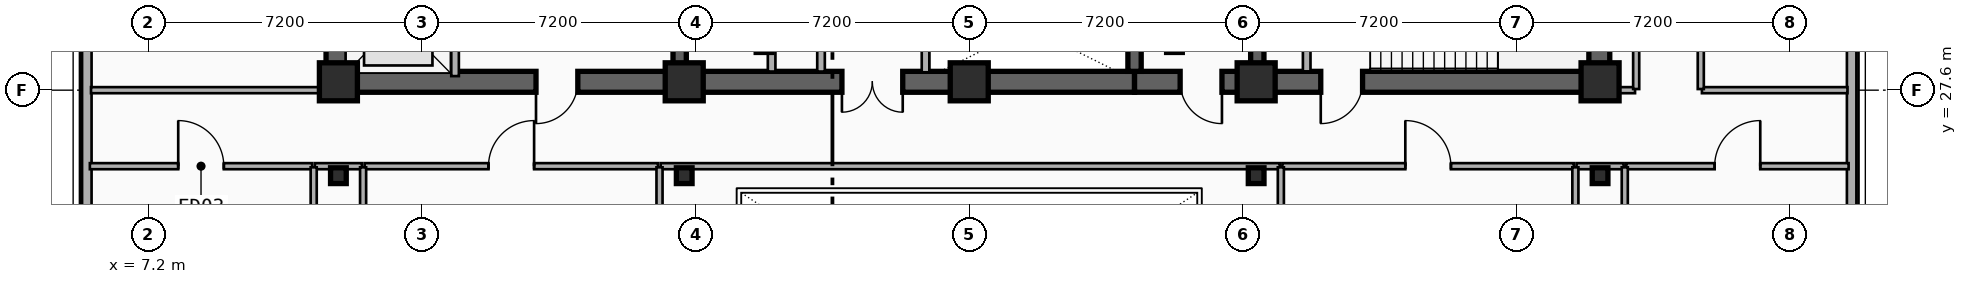
"""IFC4 building model, lengths in metres.
Left out: names, types, materials, properties, quantities, classifications, styles, units other than length and angle.
Written with IfcOpenShell. Run it as: python <this file> out.ifc"""

import sys

from ifc_helpers import new_model, si_unit, direction, frame, frame_2d, origin, origin_2d, place, context, subcontext, project, spatial, rectangle, i_section, extrude, element, fill, save


model = new_model("IFC4")
c1 = context("Model", 3, precision=1e-05, world=origin(), true_north=direction((0.0, 1.0)))
c2 = subcontext(c1, "Body", "Model", "MODEL_VIEW")
j1 = project(units=[si_unit("LENGTHUNIT", "METRE"), si_unit("PLANEANGLEUNIT", "RADIAN")], contexts=[c1])
p1 = place(None, origin())
s1 = spatial("IfcSite", under=j1, at=p1, CompositionType="ELEMENT")
p2 = place(p1, origin())
s2 = spatial("IfcBuilding", under=s1, at=p2, CompositionType="ELEMENT")
p3 = place(p2, frame((0.0, 0.0, 188.4)))
s3 = spatial("IfcBuildingStorey", under=s2, at=p3, CompositionType="ELEMENT", Elevation=188.4)
p4 = place(p3, frame((21.18, 27.82, 0.0), z_axis=(0.0, 0.0, 1.0), x_axis=(-1.0, 0.0, 0.0)))
e1 = element("IfcWall", 1, at=p4, inside=s3, PredefinedType="SHEAR", context=c2, shape_type="SweptSolid", body=[
    extrude(rectangle(XDim=9.03, YDim=0.55, at=frame_2d((4.515, 0.0))), origin(), (0.0, 0.0, 1.0), 4.8),
])
p5 = place(p4, frame((2.68, 0.0, 0.0)))
e2 = element("IfcOpeningElement", 2, at=p5, cuts=e1, PredefinedType="OPENING", context=c2, shape_type="SweptSolid", body=[
    extrude(rectangle(XDim=1.1, YDim=2.15, at=frame_2d((0.55, 1.075))), frame((0.0, 0.285, 0.0), z_axis=(0.0, -1.0, 0.0), x_axis=(1.0, 0.0, 0.0)), (0.0, 0.0, 1.0), 0.57),
])
p6 = place(p3, frame((33.15, 27.82, 0.0), z_axis=(0.0, 0.0, 1.0), x_axis=(-1.0, 0.0, 0.0)))
e3 = element("IfcWall", 3, at=p6, inside=s3, PredefinedType="SHEAR", context=c2, shape_type="SweptSolid", body=[
    extrude(rectangle(XDim=11.97, YDim=0.55, at=frame_2d((5.985, 0.0))), origin(), (0.0, 0.0, 1.0), 4.8),
])
p7 = place(p6, frame((6.1, 0.0, 0.0)))
e4 = element("IfcOpeningElement", 4, at=p7, cuts=e3, PredefinedType="OPENING", context=c2, shape_type="SweptSolid", body=[
    extrude(rectangle(XDim=1.6, YDim=2.2, at=frame_2d((0.8, 1.1))), frame((0.0, 0.285, 0.0), z_axis=(0.0, -1.0, 0.0), x_axis=(1.0, 0.0, 0.0)), (0.0, 0.0, 1.0), 0.57),
])
p8 = place(p3, frame((45.38, 27.82, 0.0), z_axis=(0.0, 0.0, 1.0), x_axis=(-1.0, 0.0, 0.0)))
e5 = element("IfcWall", 5, at=p8, inside=s3, PredefinedType="SHEAR", context=c2, shape_type="SweptSolid", body=[
    extrude(rectangle(XDim=12.23, YDim=0.55, at=frame_2d((6.115, 0.0))), origin(), (0.0, 0.0, 1.0), 4.8),
])
p9 = place(p8, frame((9.93, 0.0, 0.0)))
e6 = element("IfcOpeningElement", 6, at=p9, cuts=e5, PredefinedType="OPENING", context=c2, shape_type="SweptSolid", body=[
    extrude(rectangle(XDim=1.1, YDim=2.15, at=frame_2d((0.55, 1.075))), frame((0.0, 0.285, 0.0), z_axis=(0.0, -1.0, 0.0), x_axis=(1.0, 0.0, 0.0)), (0.0, 0.0, 1.0), 0.57),
])
p10 = place(p8, frame((6.23, 0.0, 0.0)))
e7 = element("IfcOpeningElement", 7, at=p10, cuts=e5, PredefinedType="OPENING", context=c2, shape_type="SweptSolid", body=[
    extrude(rectangle(XDim=1.1, YDim=2.15, at=frame_2d((0.55, 1.075))), frame((0.0, 0.285, 0.0), z_axis=(0.0, -1.0, 0.0), x_axis=(1.0, 0.0, 0.0)), (0.0, 0.0, 1.0), 0.57),
])
for number, where, z_axis, x_axis in (
    (8, (12.15, 28.095, 0.0), (0.0, 0.0, 1.0), (0.0, 1.0, 0.0)),
    (9, (45.38, 28.095, 0.0), (0.0, 0.0, 1.0), (0.0, 1.0, 0.0)),
):
    element("IfcWall", number, at=place(p3, frame(where, z_axis=z_axis, x_axis=x_axis)), inside=s3, PredefinedType="SHEAR", context=c2, shape_type="SweptSolid", body=[
        extrude(rectangle(XDim=8.68, YDim=0.55, at=frame_2d((4.34, 0.0))), origin(), (0.0, 0.0, 1.0), 4.8),
    ])
for number, where, z_axis, x_axis in (
    (10, (21.18, 28.095, 0.0), (0.0, 0.0, 1.0), (0.0, 1.0, 0.0)),
    (11, (33.15, 28.095, 0.0), (0.0, 0.0, 1.0), (0.0, 1.0, 0.0)),
):
    element("IfcWall", number, at=place(p3, frame(where, z_axis=z_axis, x_axis=x_axis)), inside=s3, PredefinedType="SHEAR", context=c2, shape_type="SweptSolid", body=[
        extrude(rectangle(XDim=8.68, YDim=0.35, at=frame_2d((4.34, 0.0))), origin(), (0.0, 0.0, 1.0), 4.8),
    ])
p11 = place(p3, frame((36.38, 28.095, 0.0), z_axis=(0.0, 0.0, 1.0), x_axis=(0.0, 1.0, 0.0)))
e12 = element("IfcWall", 12, at=p11, inside=s3, PredefinedType="SHEAR", context=c2, shape_type="SweptSolid", body=[
    extrude(rectangle(XDim=8.68, YDim=0.35, at=frame_2d((4.34, 0.0))), origin(), (0.0, 0.0, 1.0), 4.8),
])
p12 = place(p11, frame((3.685, 0.0, 0.0)))
e13 = element("IfcOpeningElement", 13, at=p12, cuts=e12, PredefinedType="OPENING", context=c2, shape_type="SweptSolid", body=[
    extrude(rectangle(XDim=1.1, YDim=2.15, at=frame_2d((0.55, 1.075))), frame((0.0, 0.185, 0.0), z_axis=(0.0, -1.0, 0.0), x_axis=(1.0, 0.0, 0.0)), (0.0, 0.0, 1.0), 0.37),
])
for number, where, z_axis, x_axis in (
    (14, (23.4, 28.8, 0.0), (0.0, 0.0, 1.0), (1.0, 0.0, 0.0)),
    (15, (34.2, 28.8, 0.0), (0.0, 0.0, 1.0), (1.0, 0.0, 0.0)),
):
    element("IfcColumn", number, at=place(p3, frame(where, z_axis=z_axis, x_axis=x_axis)), inside=s3, PredefinedType="COLUMN", context=c2, shape_type="SweptSolid", body=[
        extrude(i_section(OverallWidth=0.413, OverallDepth=0.415, WebThickness=0.03, FlangeThickness=0.047, FilletRadius=0.015, at=origin_2d()), origin(), (0.0, 0.0, 1.0), 4.8),
    ])
for number, where, z_axis, x_axis in (
    (16, (12.2, 27.82, 0.0), (0.0, 0.0, 1.0), (1.0, 0.0, 0.0)),
    (17, (21.3, 27.82, 0.0), (0.0, 0.0, 1.0), (1.0, 0.0, 0.0)),
    (18, (28.8, 27.82, 0.0), (0.0, 0.0, 1.0), (1.0, 0.0, 0.0)),
    (19, (36.35, 27.82, 0.0), (0.0, 0.0, 1.0), (1.0, 0.0, 0.0)),
    (20, (45.4, 27.82, 0.0), (0.0, 0.0, 1.0), (1.0, 0.0, 0.0)),
):
    element("IfcColumn", number, at=place(p3, frame(where, z_axis=z_axis, x_axis=x_axis)), inside=s3, PredefinedType="COLUMN", context=c2, shape_type="SweptSolid", body=[
        extrude(rectangle(XDim=1.0, YDim=1.0, at=origin_2d()), origin(), (0.0, 0.0, 1.0), 4.8),
    ])
for number, where, z_axis, x_axis in (
    (21, (12.2, 25.35, 0.0), (0.0, 0.0, 1.0), (1.0, 0.0, 0.0)),
    (22, (21.3, 25.35, 0.0), (0.0, 0.0, 1.0), (1.0, 0.0, 0.0)),
    (23, (36.35, 25.35, 0.0), (0.0, 0.0, 1.0), (1.0, 0.0, 0.0)),
    (24, (45.4, 25.35, 0.0), (0.0, 0.0, 1.0), (1.0, 0.0, 0.0)),
):
    element("IfcColumn", number, at=place(p3, frame(where, z_axis=z_axis, x_axis=x_axis)), inside=s3, PredefinedType="COLUMN", context=c2, shape_type="SweptSolid", body=[
        extrude(i_section(OverallWidth=0.413, OverallDepth=0.415, WebThickness=0.03, FlangeThickness=0.047, FilletRadius=0.015, at=origin_2d()), origin(), (0.0, 0.0, 1.0), 4.8),
    ])
for number, where, z_axis, x_axis in (
    (25, (52.02, 37.6, 0.0), (0.0, 0.0, 1.0), (0.0, -1.0, 0.0)),
    (26, (5.58, 14.6, 0.0), (0.0, 0.0, 1.0), (0.0, 1.0, 0.0)),
):
    element("IfcWall", number, at=place(p3, frame(where, z_axis=z_axis, x_axis=x_axis)), inside=s3, PredefinedType="SOLIDWALL", context=c2, shape_type="SweptSolid", body=[
        extrude(rectangle(XDim=23.0, YDim=0.25, at=frame_2d((11.5, 0.0))), origin(), (0.0, 0.0, 1.0), 4.48),
    ])
p13 = place(p3, frame((15.27, 27.97, 0.0), z_axis=(0.0, 0.0, 1.0), x_axis=(0.0, 1.0, 0.0)))
e27 = element("IfcWall", 27, at=p13, inside=s3, PredefinedType="PARTITIONING", context=c2, shape_type="SweptSolid", body=[
    extrude(rectangle(XDim=2.96, YDim=0.2, at=frame_2d((1.48, 0.0))), origin(), (0.0, 0.0, 1.0), 3.55),
])
p14 = place(p13, frame((0.93, 0.0, 0.0)))
e28 = element("IfcOpeningElement", 28, at=p14, cuts=e27, PredefinedType="OPENING", context=c2, shape_type="SweptSolid", body=[
    extrude(rectangle(XDim=1.1, YDim=2.15, at=frame_2d((0.55, 1.075))), frame((0.0, 0.11, 0.0), z_axis=(0.0, -1.0, 0.0), x_axis=(1.0, 0.0, 0.0)), (0.0, 0.0, 1.0), 0.22),
])
p15 = place(p3, frame((27.65, 28.07, 0.0), z_axis=(0.0, 0.0, 1.0), x_axis=(0.0, 1.0, 0.0)))
e29 = element("IfcWall", 29, at=p15, inside=s3, PredefinedType="PARTITIONING", context=c2, shape_type="SweptSolid", body=[
    extrude(rectangle(XDim=2.58, YDim=0.2, at=frame_2d((1.29, 0.0))), origin(), (0.0, 0.0, 1.0), 3.55),
])
p16 = place(p3, frame((37.68, 28.095, 0.0), z_axis=(0.0, 0.0, 1.0), x_axis=(0.0, 1.0, 0.0)))
e30 = element("IfcWall", 30, at=p16, inside=s3, PredefinedType="PARTITIONING", context=c2, shape_type="SweptSolid", body=[
    extrude(rectangle(XDim=3.155, YDim=0.2, at=frame_2d((1.578, 0.0))), origin(), (0.0, 0.0, 1.0), 3.86),
])
p17 = place(p3, frame((24.9, 28.09, 0.0), z_axis=(0.0, 0.0, 1.0), x_axis=(0.0, 1.0, 0.0)))
e31 = element("IfcWall", 31, at=p17, inside=s3, PredefinedType="PARTITIONING", context=c2, shape_type="SweptSolid", body=[
    extrude(rectangle(XDim=2.62, YDim=0.2, at=frame_2d((1.31, 0.0))), origin(), (0.0, 0.0, 1.0), 3.86),
])
p18 = place(p17, frame((1.185, 0.0, 0.0)))
e32 = element("IfcOpeningElement", 32, at=p18, cuts=e31, PredefinedType="OPENING", context=c2, shape_type="SweptSolid", body=[
    extrude(rectangle(XDim=1.2, YDim=2.15, at=frame_2d((0.6, 1.075))), frame((0.0, 0.11, 0.0), z_axis=(0.0, -1.0, 0.0), x_axis=(1.0, 0.0, 0.0)), (0.0, 0.0, 1.0), 0.22),
])
p19 = place(p3, frame((23.6, 28.09, 0.0), z_axis=(0.0, 0.0, 1.0), x_axis=(0.0, 1.0, 0.0)))
e33 = element("IfcWall", 33, at=p19, inside=s3, PredefinedType="PARTITIONING", context=c2, shape_type="SweptSolid", body=[
    extrude(rectangle(XDim=2.62, YDim=0.2, at=frame_2d((1.31, 0.0))), origin(), (0.0, 0.0, 1.0), 3.86),
])
p20 = place(p3, frame((5.66, 25.6, 0.0), z_axis=(0.0, 0.0, 1.0), x_axis=(1.0, 0.0, 0.0)))
e34 = element("IfcWall", 34, at=p20, inside=s3, PredefinedType="PARTITIONING", context=c2, shape_type="SweptSolid", body=[
    extrude(rectangle(XDim=5.85, YDim=0.16, at=frame_2d((2.925, 0.0))), origin(), (0.0, 0.0, 1.0), 3.81),
])
p21 = place(p20, frame((2.325, 0.0, 0.0)))
e35 = element("IfcOpeningElement", 35, at=p21, cuts=e34, PredefinedType="OPENING", context=c2, shape_type="SweptSolid", body=[
    extrude(rectangle(XDim=1.2, YDim=2.15, at=frame_2d((0.6, 1.075))), frame((0.0, 0.09, 0.0), z_axis=(0.0, -1.0, 0.0), x_axis=(1.0, 0.0, 0.0)), (0.0, 0.0, 1.0), 0.18),
])
p22 = place(p3, frame((12.89, 25.6, 0.0), z_axis=(0.0, 0.0, 1.0), x_axis=(1.0, 0.0, 0.0)))
e36 = element("IfcWall", 36, at=p22, inside=s3, PredefinedType="PARTITIONING", context=c2, shape_type="SweptSolid", body=[
    extrude(rectangle(XDim=7.72, YDim=0.16, at=frame_2d((3.86, 0.0))), origin(), (0.0, 0.0, 1.0), 4.48),
])
p23 = place(p22, frame((3.26, 0.0, 0.0)))
e37 = element("IfcOpeningElement", 37, at=p23, cuts=e36, PredefinedType="OPENING", context=c2, shape_type="SweptSolid", body=[
    extrude(rectangle(XDim=1.2, YDim=2.15, at=frame_2d((0.6, 1.075))), frame((0.0, 0.09, 0.0), z_axis=(0.0, -1.0, 0.0), x_axis=(1.0, 0.0, 0.0)), (0.0, 0.0, 1.0), 0.18),
])
p24 = place(p3, frame((37.04, 25.6, 0.0), z_axis=(0.0, 0.0, 1.0), x_axis=(1.0, 0.0, 0.0)))
e38 = element("IfcWall", 38, at=p24, inside=s3, PredefinedType="PARTITIONING", context=c2, shape_type="SweptSolid", body=[
    extrude(rectangle(XDim=7.67, YDim=0.16, at=frame_2d((3.835, 0.0))), origin(), (0.0, 0.0, 1.0), 4.48),
])
p25 = place(p24, frame((3.235, 0.0, 0.0)))
e39 = element("IfcOpeningElement", 39, at=p25, cuts=e38, PredefinedType="OPENING", context=c2, shape_type="SweptSolid", body=[
    extrude(rectangle(XDim=1.2, YDim=2.15, at=frame_2d((0.6, 1.075))), frame((0.0, 0.09, 0.0), z_axis=(0.0, -1.0, 0.0), x_axis=(1.0, 0.0, 0.0)), (0.0, 0.0, 1.0), 0.18),
])
p26 = place(p3, frame((46.09, 25.6, 0.0), z_axis=(0.0, 0.0, 1.0), x_axis=(1.0, 0.0, 0.0)))
e40 = element("IfcWall", 40, at=p26, inside=s3, PredefinedType="PARTITIONING", context=c2, shape_type="SweptSolid", body=[
    extrude(rectangle(XDim=5.85, YDim=0.16, at=frame_2d((2.925, 0.0))), origin(), (0.0, 0.0, 1.0), 3.81),
])
p27 = place(p26, frame((2.325, 0.0, 0.0)))
e41 = element("IfcOpeningElement", 41, at=p27, cuts=e40, PredefinedType="OPENING", context=c2, shape_type="SweptSolid", body=[
    extrude(rectangle(XDim=1.2, YDim=2.15, at=frame_2d((0.6, 1.075))), frame((0.0, 0.09, 0.0), z_axis=(0.0, -1.0, 0.0), x_axis=(1.0, 0.0, 0.0)), (0.0, 0.0, 1.0), 0.18),
])
p28 = place(p3, frame((11.58, 25.6, 0.0), z_axis=(0.0, 0.0, 1.0), x_axis=(1.0, 0.0, 0.0)))
e42 = element("IfcWall", 42, at=p28, inside=s3, PredefinedType="PARTITIONING", context=c2, shape_type="SweptSolid", body=[
    extrude(rectangle(XDim=1.24, YDim=0.16, at=frame_2d((0.62, 0.0))), origin(), (0.0, 0.0, 1.0), 3.56),
])
p29 = place(p3, frame((20.68, 25.6, 0.0), z_axis=(0.0, 0.0, 1.0), x_axis=(1.0, 0.0, 0.0)))
e43 = element("IfcWall", 43, at=p29, inside=s3, PredefinedType="PARTITIONING", context=c2, shape_type="SweptSolid", body=[
    extrude(rectangle(XDim=16.29, YDim=0.16, at=frame_2d((8.145, 0.0))), origin(), (0.0, 0.0, 1.0), 3.56),
])
p30 = place(p3, frame((44.78, 25.6, 0.0), z_axis=(0.0, 0.0, 1.0), x_axis=(1.0, 0.0, 0.0)))
e44 = element("IfcWall", 44, at=p30, inside=s3, PredefinedType="PARTITIONING", context=c2, shape_type="SweptSolid", body=[
    extrude(rectangle(XDim=1.24, YDim=0.16, at=frame_2d((0.62, 0.0))), origin(), (0.0, 0.0, 1.0), 3.56),
])
p31 = place(p3, frame((5.69, 27.6, 0.0), z_axis=(0.0, 0.0, 1.0), x_axis=(1.0, 0.0, 0.0)))
e45 = element("IfcWall", 45, at=p31, inside=s3, PredefinedType="PARTITIONING", context=c2, shape_type="SweptSolid", body=[
    extrude(rectangle(XDim=6.43, YDim=0.16, at=frame_2d((3.215, 0.0))), origin(), (0.0, 0.0, 1.0), 3.55),
])
p32 = place(p3, frame((45.41, 27.6, 0.0), z_axis=(0.0, 0.0, 1.0), x_axis=(1.0, 0.0, 0.0)))
e46 = element("IfcWall", 46, at=p32, inside=s3, PredefinedType="PARTITIONING", context=c2, shape_type="SweptSolid", body=[
    extrude(rectangle(XDim=0.91, YDim=0.16, at=frame_2d((0.455, 0.0))), origin(), (0.0, 0.0, 1.0), 3.55),
])
p33 = place(p3, frame((48.08, 27.6, 0.0), z_axis=(0.0, 0.0, 1.0), x_axis=(1.0, 0.0, 0.0)))
e47 = element("IfcWall", 47, at=p33, inside=s3, PredefinedType="PARTITIONING", context=c2, shape_type="SweptSolid", body=[
    extrude(rectangle(XDim=3.83, YDim=0.16, at=frame_2d((1.915, 0.0))), origin(), (0.0, 0.0, 1.0), 3.81),
])
for number, where, z_axis, x_axis in (
    (48, (46.35, 27.63, 0.0), (0.0, 0.0, 1.0), (0.0, 1.0, 0.0)),
    (49, (48.05, 27.63, 0.0), (0.0, 0.0, 1.0), (0.0, 1.0, 0.0)),
):
    element("IfcWall", number, at=place(p3, frame(where, z_axis=z_axis, x_axis=x_axis)), inside=s3, PredefinedType="PARTITIONING", context=c2, shape_type="SweptSolid", body=[
        extrude(rectangle(XDim=10.24, YDim=0.16, at=frame_2d((5.12, 0.0))), origin(), (0.0, 0.0, 1.0), 3.96),
    ])
for number, where, z_axis, x_axis in (
    (50, (11.55, 10.69, 0.0), (0.0, 0.0, 1.0), (0.0, 1.0, 0.0)),
    (51, (12.85, 10.69, 0.0), (0.0, 0.0, 1.0), (0.0, 1.0, 0.0)),
    (52, (20.65, 10.69, 0.0), (0.0, 0.0, 1.0), (0.0, 1.0, 0.0)),
    (53, (37.0, 10.69, 0.0), (0.0, 0.0, 1.0), (0.0, 1.0, 0.0)),
    (54, (44.75, 10.69, 0.0), (0.0, 0.0, 1.0), (0.0, 1.0, 0.0)),
    (55, (46.05, 10.69, 0.0), (0.0, 0.0, 1.0), (0.0, 1.0, 0.0)),
):
    element("IfcWall", number, at=place(p3, frame(where, z_axis=z_axis, x_axis=x_axis)), inside=s3, PredefinedType="PARTITIONING", context=c2, shape_type="SweptSolid", body=[
        extrude(rectangle(XDim=14.88, YDim=0.16, at=frame_2d((7.44, 0.0))), origin(), (0.0, 0.0, 1.0), 3.96),
    ])
p34 = place(p5, origin())
e56 = element("IfcDoor", 56, at=p34, inside=s3, OperationType="SINGLE_SWING_RIGHT", PredefinedType="DOOR", context=c2, shape_type="SweptSolid", body=[
    extrude(rectangle(XDim=1.1, YDim=2.15, at=frame_2d((0.55, 1.075))), frame((0.0, 0.025, 0.0), z_axis=(0.0, -1.0, 0.0), x_axis=(1.0, 0.0, 0.0)), (0.0, 0.0, 1.0), 0.05),
])
fill(e2, e56)
p35 = place(p9, origin())
e57 = element("IfcDoor", 57, at=p35, inside=s3, OperationType="SINGLE_SWING_LEFT", PredefinedType="DOOR", context=c2, shape_type="SweptSolid", body=[
    extrude(rectangle(XDim=1.1, YDim=2.15, at=frame_2d((0.55, 1.075))), frame((0.0, 0.025, 0.0), z_axis=(0.0, -1.0, 0.0), x_axis=(1.0, 0.0, 0.0)), (0.0, 0.0, 1.0), 0.05),
])
fill(e6, e57)
p36 = place(p10, origin())
e58 = element("IfcDoor", 58, at=p36, inside=s3, OperationType="SINGLE_SWING_RIGHT", PredefinedType="DOOR", context=c2, shape_type="SweptSolid", body=[
    extrude(rectangle(XDim=1.1, YDim=2.15, at=frame_2d((0.55, 1.075))), frame((0.0, 0.025, 0.0), z_axis=(0.0, -1.0, 0.0), x_axis=(1.0, 0.0, 0.0)), (0.0, 0.0, 1.0), 0.05),
])
fill(e7, e58)
p37 = place(p7, origin())
e59 = element("IfcDoor", 59, at=p37, inside=s3, OperationType="SINGLE_SWING_LEFT", PredefinedType="DOOR", context=c2, shape_type="SweptSolid", body=[
    extrude(rectangle(XDim=1.6, YDim=2.2, at=frame_2d((0.8, 1.1))), frame((0.0, 0.025, 0.0), z_axis=(0.0, -1.0, 0.0), x_axis=(1.0, 0.0, 0.0)), (0.0, 0.0, 1.0), 0.05),
])
fill(e4, e59)
p38 = place(p21, origin())
e60 = element("IfcDoor", 60, at=p38, inside=s3, OperationType="SINGLE_SWING_LEFT", PredefinedType="DOOR", context=c2, shape_type="SweptSolid", body=[
    extrude(rectangle(XDim=1.2, YDim=2.15, at=frame_2d((0.6, 1.075))), frame((0.0, 0.025, 0.0), z_axis=(0.0, -1.0, 0.0), x_axis=(1.0, 0.0, 0.0)), (0.0, 0.0, 1.0), 0.05),
])
fill(e35, e60)
p39 = place(p23, origin())
e61 = element("IfcDoor", 61, at=p39, inside=s3, OperationType="SINGLE_SWING_RIGHT", PredefinedType="DOOR", context=c2, shape_type="SweptSolid", body=[
    extrude(rectangle(XDim=1.2, YDim=2.15, at=frame_2d((0.6, 1.075))), frame((0.0, 0.025, 0.0), z_axis=(0.0, -1.0, 0.0), x_axis=(1.0, 0.0, 0.0)), (0.0, 0.0, 1.0), 0.05),
])
fill(e37, e61)
p40 = place(p25, origin())
e62 = element("IfcDoor", 62, at=p40, inside=s3, OperationType="SINGLE_SWING_LEFT", PredefinedType="DOOR", context=c2, shape_type="SweptSolid", body=[
    extrude(rectangle(XDim=1.2, YDim=2.15, at=frame_2d((0.6, 1.075))), frame((0.0, 0.025, 0.0), z_axis=(0.0, -1.0, 0.0), x_axis=(1.0, 0.0, 0.0)), (0.0, 0.0, 1.0), 0.05),
])
fill(e39, e62)
p41 = place(p27, origin())
e63 = element("IfcDoor", 63, at=p41, inside=s3, OperationType="SINGLE_SWING_RIGHT", PredefinedType="DOOR", context=c2, shape_type="SweptSolid", body=[
    extrude(rectangle(XDim=1.2, YDim=2.15, at=frame_2d((0.6, 1.075))), frame((0.0, 0.025, 0.0), z_axis=(0.0, -1.0, 0.0), x_axis=(1.0, 0.0, 0.0)), (0.0, 0.0, 1.0), 0.05),
])
fill(e41, e63)
save(model, sys.argv[1])
